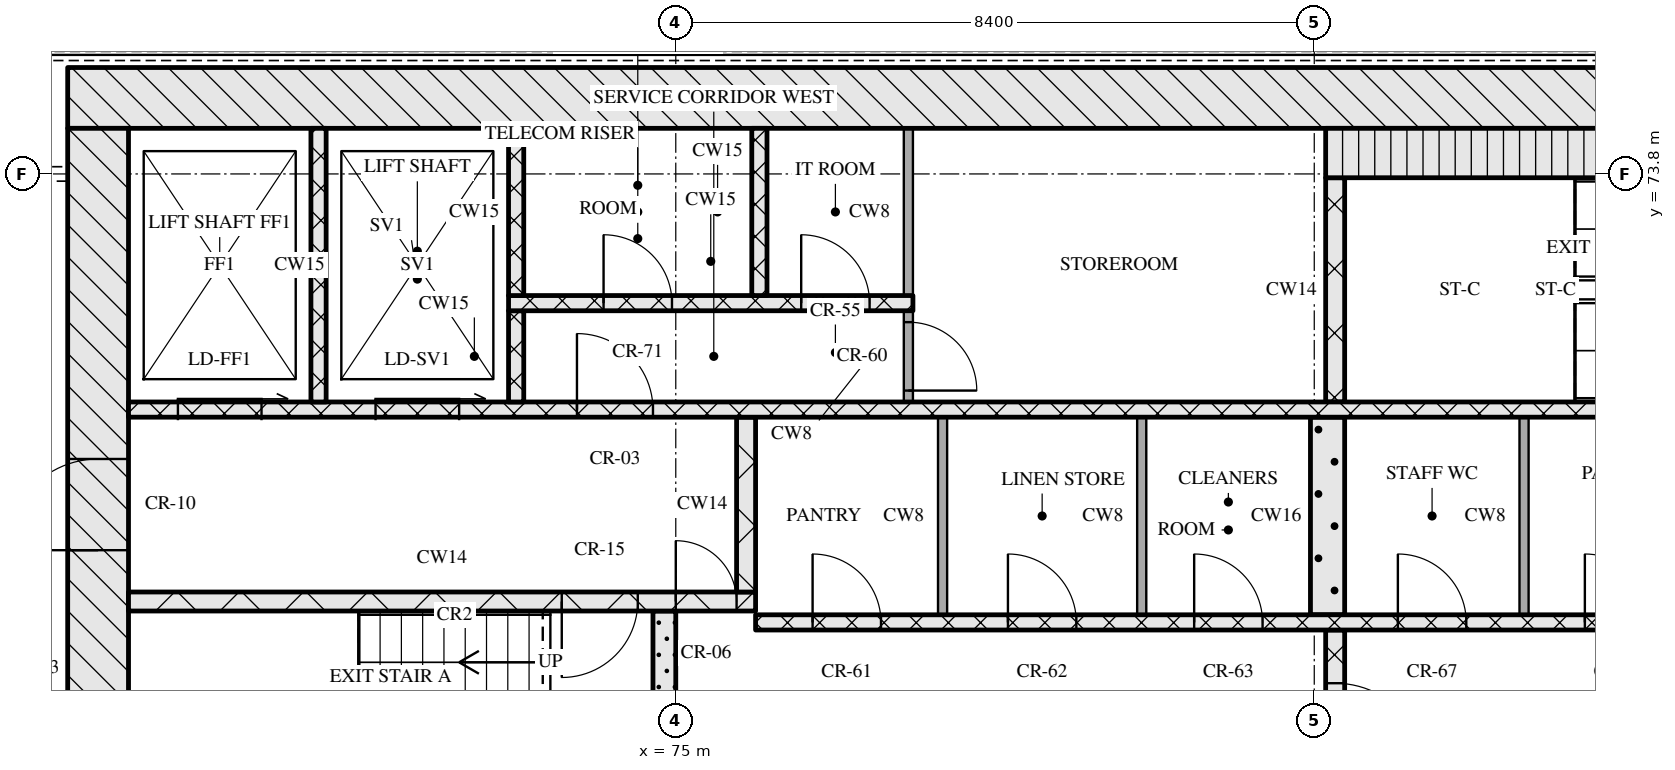
"""IFC4 building model, lengths in metres.
Left out: names, types, materials, properties, quantities, classifications, styles, units other than length and angle.
Written with IfcOpenShell. Run it as: python <this file> out.ifc"""

import sys

from ifc_helpers import new_model, si_unit, direction, frame, frame_2d, origin, place, context, subcontext, project, spatial, rectangle, extrude, element, fill, save


model = new_model("IFC4")
c1 = context("Model", 3, precision=1e-05, world=origin(), true_north=direction((0.0, 1.0)))
c2 = subcontext(c1, "Body", "Model", "MODEL_VIEW")
j1 = project(units=[si_unit("LENGTHUNIT", "METRE"), si_unit("PLANEANGLEUNIT", "RADIAN")], contexts=[c1])
p1 = place(None, origin())
s1 = spatial("IfcSite", under=j1, at=p1, CompositionType="ELEMENT")
p2 = place(p1, origin())
s2 = spatial("IfcBuilding", under=s1, at=p2, CompositionType="ELEMENT")
p3 = place(p2, frame((0.0, 0.0, 179.85)))
s3 = spatial("IfcBuildingStorey", under=s2, at=p3, CompositionType="ELEMENT", Elevation=179.85)
p4 = place(p3, frame((67.0, 74.8, 0.0), z_axis=(0.0, 0.0, 1.0), x_axis=(1.0, 0.0, 0.0)))
e1 = element("IfcWall", 1, at=p4, inside=s3, PredefinedType="SOLIDWALL", context=c2, shape_type="SweptSolid", body=[
    extrude(rectangle(XDim=41.2, YDim=0.8, at=frame_2d((20.6, 0.0))), origin(), (0.0, 0.0, 1.0), 3.32),
])
p5 = place(p3, frame((67.4, 62.4, 0.0), z_axis=(0.0, 0.0, 1.0), x_axis=(0.0, 1.0, 0.0)))
e2 = element("IfcWall", 2, at=p5, inside=s3, PredefinedType="SOLIDWALL", context=c2, shape_type="SweptSolid", body=[
    extrude(rectangle(XDim=12.0, YDim=0.8, at=frame_2d((6.0, 0.0))), origin(), (0.0, 0.0, 1.0), 3.32),
])
p6 = place(p5, frame((6.45, 0.0, 0.0)))
e3 = element("IfcOpeningElement", 3, at=p6, cuts=e2, PredefinedType="OPENING", context=c2, shape_type="SweptSolid", body=[
    extrude(rectangle(XDim=1.2, YDim=2.1, at=frame_2d((0.6, 1.05))), frame((0.0, 0.41, 0.0), z_axis=(0.0, -1.0, 0.0), x_axis=(1.0, 0.0, 0.0)), (0.0, 0.0, 1.0), 0.82),
])
p7 = place(p3, frame((74.85, 65.2, 0.0), z_axis=(0.0, 0.0, 1.0), x_axis=(0.0, 1.0, 0.0)))
e4 = element("IfcWall", 4, at=p7, inside=s3, PredefinedType="SOLIDWALL", context=c2, shape_type="SweptSolid", body=[
    extrude(rectangle(XDim=2.85, YDim=0.3, at=frame_2d((1.425, 0.0))), origin(), (0.0, 0.0, 1.0), 3.32),
])
p8 = place(p3, frame((83.675, 65.2, 0.0), z_axis=(0.0, 0.0, 1.0), x_axis=(0.0, 1.0, 0.0)))
e5 = element("IfcWall", 5, at=p8, inside=s3, PredefinedType="SOLIDWALL", context=c2, shape_type="SweptSolid", body=[
    extrude(rectangle(XDim=2.6, YDim=0.25, at=frame_2d((1.3, 0.0))), origin(), (0.0, 0.0, 1.0), 3.32),
])
p9 = place(p8, frame((0.7, 0.0, 0.0)))
e6 = element("IfcOpeningElement", 6, at=p9, cuts=e5, PredefinedType="OPENING", context=c2, shape_type="SweptSolid", body=[
    extrude(rectangle(XDim=1.2, YDim=2.1, at=frame_2d((0.6, 1.05))), frame((0.0, 0.135, 0.0), z_axis=(0.0, -1.0, 0.0), x_axis=(1.0, 0.0, 0.0)), (0.0, 0.0, 1.0), 0.27),
])
p10 = place(p3, frame((76.05, 67.9, 0.0), z_axis=(0.0, 0.0, 1.0), x_axis=(1.0, 0.0, 0.0)))
e7 = element("IfcWall", 7, at=p10, inside=s3, PredefinedType="SOLIDWALL", context=c2, shape_type="SweptSolid", body=[
    extrude(rectangle(XDim=23.1, YDim=0.2, at=frame_2d((11.55, 0.0))), origin(), (0.0, 0.0, 1.0), 3.32),
])
p11 = place(p10, frame((0.75, 0.0, 0.0)))
e8 = element("IfcOpeningElement", 8, at=p11, cuts=e7, PredefinedType="OPENING", context=c2, shape_type="SweptSolid", body=[
    extrude(rectangle(XDim=0.9, YDim=2.1, at=frame_2d((0.45, 1.05))), frame((0.0, 0.11, 0.0), z_axis=(0.0, -1.0, 0.0), x_axis=(1.0, 0.0, 0.0)), (0.0, 0.0, 1.0), 0.22),
])
p12 = place(p10, frame((3.32, 0.0, 0.0)))
e9 = element("IfcOpeningElement", 9, at=p12, cuts=e7, PredefinedType="OPENING", context=c2, shape_type="SweptSolid", body=[
    extrude(rectangle(XDim=0.9, YDim=2.1, at=frame_2d((0.45, 1.05))), frame((0.0, 0.11, 0.0), z_axis=(0.0, -1.0, 0.0), x_axis=(1.0, 0.0, 0.0)), (0.0, 0.0, 1.0), 0.22),
])
p13 = place(p10, frame((5.77, 0.0, 0.0)))
e10 = element("IfcOpeningElement", 10, at=p13, cuts=e7, PredefinedType="OPENING", context=c2, shape_type="SweptSolid", body=[
    extrude(rectangle(XDim=0.9, YDim=2.1, at=frame_2d((0.45, 1.05))), frame((0.0, 0.11, 0.0), z_axis=(0.0, -1.0, 0.0), x_axis=(1.0, 0.0, 0.0)), (0.0, 0.0, 1.0), 0.22),
])
p14 = place(p10, frame((8.45, 0.0, 0.0)))
e11 = element("IfcOpeningElement", 11, at=p14, cuts=e7, PredefinedType="OPENING", context=c2, shape_type="SweptSolid", body=[
    extrude(rectangle(XDim=0.9, YDim=2.1, at=frame_2d((0.45, 1.05))), frame((0.0, 0.11, 0.0), z_axis=(0.0, -1.0, 0.0), x_axis=(1.0, 0.0, 0.0)), (0.0, 0.0, 1.0), 0.22),
])
p15 = place(p10, frame((10.91, 0.0, 0.0)))
e12 = element("IfcOpeningElement", 12, at=p15, cuts=e7, PredefinedType="OPENING", context=c2, shape_type="SweptSolid", body=[
    extrude(rectangle(XDim=0.9, YDim=2.1, at=frame_2d((0.45, 1.05))), frame((0.0, 0.11, 0.0), z_axis=(0.0, -1.0, 0.0), x_axis=(1.0, 0.0, 0.0)), (0.0, 0.0, 1.0), 0.22),
])
p16 = place(p10, frame((13.55, 0.0, 0.0)))
e13 = element("IfcOpeningElement", 13, at=p16, cuts=e7, PredefinedType="OPENING", context=c2, shape_type="SweptSolid", body=[
    extrude(rectangle(XDim=1.0, YDim=2.1, at=frame_2d((0.5, 1.05))), frame((0.0, 0.11, 0.0), z_axis=(0.0, -1.0, 0.0), x_axis=(1.0, 0.0, 0.0)), (0.0, 0.0, 1.0), 0.22),
])
p17 = place(p10, frame((16.2, 0.0, 0.0)))
e14 = element("IfcOpeningElement", 14, at=p17, cuts=e7, PredefinedType="OPENING", context=c2, shape_type="SweptSolid", body=[
    extrude(rectangle(XDim=1.1, YDim=2.1, at=frame_2d((0.55, 1.05))), frame((0.0, 0.11, 0.0), z_axis=(0.0, -1.0, 0.0), x_axis=(1.0, 0.0, 0.0)), (0.0, 0.0, 1.0), 0.22),
])
p18 = place(p10, frame((18.7, 0.0, 0.0)))
e15 = element("IfcOpeningElement", 15, at=p18, cuts=e7, PredefinedType="OPENING", context=c2, shape_type="SweptSolid", body=[
    extrude(rectangle(XDim=1.1, YDim=2.1, at=frame_2d((0.55, 1.05))), frame((0.0, 0.11, 0.0), z_axis=(0.0, -1.0, 0.0), x_axis=(1.0, 0.0, 0.0)), (0.0, 0.0, 1.0), 0.22),
])
p19 = place(p10, frame((21.2, 0.0, 0.0)))
e16 = element("IfcOpeningElement", 16, at=p19, cuts=e7, PredefinedType="OPENING", context=c2, shape_type="SweptSolid", body=[
    extrude(rectangle(XDim=1.1, YDim=2.1, at=frame_2d((0.55, 1.05))), frame((0.0, 0.11, 0.0), z_axis=(0.0, -1.0, 0.0), x_axis=(1.0, 0.0, 0.0)), (0.0, 0.0, 1.0), 0.22),
])
for number, where, z_axis, x_axis in (
    (17, (78.51, 68.0, 0.0), (0.0, 0.0, 1.0), (0.0, 1.0, 0.0)),
    (18, (81.13, 68.0, 0.0), (0.0, 0.0, 1.0), (0.0, 1.0, 0.0)),
):
    element("IfcWall", number, at=place(p3, frame(where, z_axis=z_axis, x_axis=x_axis)), inside=s3, PredefinedType="PARTITIONING", context=c2, shape_type="SweptSolid", body=[
        extrude(rectangle(XDim=2.6, YDim=0.12, at=frame_2d((1.3, 0.0))), origin(), (0.0, 0.0, 1.0), 3.32),
    ])
p20 = place(p3, frame((83.575, 68.0, 0.0), z_axis=(0.0, 0.0, 1.0), x_axis=(0.0, 1.0, 0.0)))
e19 = element("IfcWall", 19, at=p20, inside=s3, PredefinedType="SOLIDWALL", context=c2, shape_type="SweptSolid", body=[
    extrude(rectangle(XDim=2.6, YDim=0.45, at=frame_2d((1.3, 0.0))), origin(), (0.0, 0.0, 1.0), 3.32),
])
p21 = place(p3, frame((86.16, 68.0, 0.0), z_axis=(0.0, 0.0, 1.0), x_axis=(0.0, 1.0, 0.0)))
e20 = element("IfcWall", 20, at=p21, inside=s3, PredefinedType="PARTITIONING", context=c2, shape_type="SweptSolid", body=[
    extrude(rectangle(XDim=2.6, YDim=0.12, at=frame_2d((1.3, 0.0))), origin(), (0.0, 0.0, 1.0), 3.32),
])
p22 = place(p3, frame((67.8, 68.175, 0.0), z_axis=(0.0, 0.0, 1.0), x_axis=(1.0, 0.0, 0.0)))
e21 = element("IfcWall", 21, at=p22, inside=s3, PredefinedType="SOLIDWALL", context=c2, shape_type="SweptSolid", body=[
    extrude(rectangle(XDim=8.25, YDim=0.25, at=frame_2d((4.125, 0.0))), origin(), (0.0, 0.0, 1.0), 3.32),
])
p23 = place(p22, frame((5.7, 0.0, 0.0)))
e22 = element("IfcOpeningElement", 22, at=p23, cuts=e21, PredefinedType="OPENING", context=c2, shape_type="SweptSolid", body=[
    extrude(rectangle(XDim=1.0, YDim=2.1, at=frame_2d((0.5, 1.05))), frame((0.0, 0.135, 0.0), z_axis=(0.0, -1.0, 0.0), x_axis=(1.0, 0.0, 0.0)), (0.0, 0.0, 1.0), 0.27),
])
p24 = place(p22, frame((7.2, 0.0, 0.0)))
e23 = element("IfcOpeningElement", 23, at=p24, cuts=e21, PredefinedType="OPENING", context=c2, shape_type="SweptSolid", body=[
    extrude(rectangle(XDim=0.8, YDim=2.1, at=frame_2d((0.4, 1.05))), frame((0.0, 0.135, 0.0), z_axis=(0.0, -1.0, 0.0), x_axis=(1.0, 0.0, 0.0)), (0.0, 0.0, 1.0), 0.27),
])
p25 = place(p3, frame((75.925, 68.3, 0.0), z_axis=(0.0, 0.0, 1.0), x_axis=(0.0, 1.0, 0.0)))
e24 = element("IfcWall", 24, at=p25, inside=s3, PredefinedType="SOLIDWALL", context=c2, shape_type="SweptSolid", body=[
    extrude(rectangle(XDim=2.3, YDim=0.25, at=frame_2d((1.15, 0.0))), origin(), (0.0, 0.0, 1.0), 3.32),
])
p26 = place(p3, frame((67.8, 70.7, 0.0), z_axis=(0.0, 0.0, 1.0), x_axis=(1.0, 0.0, 0.0)))
e25 = element("IfcWall", 25, at=p26, inside=s3, PredefinedType="SOLIDWALL", context=c2, shape_type="SweptSolid", body=[
    extrude(rectangle(XDim=39.6, YDim=0.2, at=frame_2d((19.8, 0.0))), origin(), (0.0, 0.0, 1.0), 3.32),
])
p27 = place(p26, frame((0.65, 0.0, 0.0)))
e26 = element("IfcOpeningElement", 26, at=p27, cuts=e25, PredefinedType="OPENING", context=c2, shape_type="SweptSolid", body=[
    extrude(rectangle(XDim=1.1, YDim=2.1, at=frame_2d((0.55, 1.05))), frame((0.0, 0.11, 0.0), z_axis=(0.0, -1.0, 0.0), x_axis=(1.0, 0.0, 0.0)), (0.0, 0.0, 1.0), 0.22),
])
p28 = place(p26, frame((3.25, 0.0, 0.0)))
e27 = element("IfcOpeningElement", 27, at=p28, cuts=e25, PredefinedType="OPENING", context=c2, shape_type="SweptSolid", body=[
    extrude(rectangle(XDim=1.1, YDim=2.1, at=frame_2d((0.55, 1.05))), frame((0.0, 0.11, 0.0), z_axis=(0.0, -1.0, 0.0), x_axis=(1.0, 0.0, 0.0)), (0.0, 0.0, 1.0), 0.22),
])
p29 = place(p26, frame((5.9, 0.0, 0.0)))
e28 = element("IfcOpeningElement", 28, at=p29, cuts=e25, PredefinedType="OPENING", context=c2, shape_type="SweptSolid", body=[
    extrude(rectangle(XDim=1.0, YDim=2.1, at=frame_2d((0.5, 1.05))), frame((0.0, 0.11, 0.0), z_axis=(0.0, -1.0, 0.0), x_axis=(1.0, 0.0, 0.0)), (0.0, 0.0, 1.0), 0.22),
])
p30 = place(p26, frame((21.7, 0.0, 0.0)))
e29 = element("IfcOpeningElement", 29, at=p30, cuts=e25, PredefinedType="OPENING", context=c2, shape_type="SweptSolid", body=[
    extrude(rectangle(XDim=1.0, YDim=2.1, at=frame_2d((0.5, 1.05))), frame((0.0, 0.11, 0.0), z_axis=(0.0, -1.0, 0.0), x_axis=(1.0, 0.0, 0.0)), (0.0, 0.0, 1.0), 0.22),
])
p31 = place(p26, frame((32.7, 0.0, 0.0)))
e30 = element("IfcOpeningElement", 30, at=p31, cuts=e25, PredefinedType="OPENING", context=c2, shape_type="SweptSolid", body=[
    extrude(rectangle(XDim=1.0, YDim=2.1, at=frame_2d((0.5, 1.05))), frame((0.0, 0.11, 0.0), z_axis=(0.0, -1.0, 0.0), x_axis=(1.0, 0.0, 0.0)), (0.0, 0.0, 1.0), 0.22),
])
p32 = place(p26, frame((35.25, 0.0, 0.0)))
e31 = element("IfcOpeningElement", 31, at=p32, cuts=e25, PredefinedType="OPENING", context=c2, shape_type="SweptSolid", body=[
    extrude(rectangle(XDim=1.1, YDim=2.1, at=frame_2d((0.55, 1.05))), frame((0.0, 0.11, 0.0), z_axis=(0.0, -1.0, 0.0), x_axis=(1.0, 0.0, 0.0)), (0.0, 0.0, 1.0), 0.22),
])
p33 = place(p26, frame((37.85, 0.0, 0.0)))
e32 = element("IfcOpeningElement", 32, at=p33, cuts=e25, PredefinedType="OPENING", context=c2, shape_type="SweptSolid", body=[
    extrude(rectangle(XDim=1.1, YDim=2.1, at=frame_2d((0.55, 1.05))), frame((0.0, 0.11, 0.0), z_axis=(0.0, -1.0, 0.0), x_axis=(1.0, 0.0, 0.0)), (0.0, 0.0, 1.0), 0.22),
])
p34 = place(p3, frame((70.3, 70.8, 0.0), z_axis=(0.0, 0.0, 1.0), x_axis=(0.0, 1.0, 0.0)))
e33 = element("IfcWall", 33, at=p34, inside=s3, PredefinedType="SOLIDWALL", context=c2, shape_type="SweptSolid", body=[
    extrude(rectangle(XDim=3.6, YDim=0.2, at=frame_2d((1.8, 0.0))), origin(), (0.0, 0.0, 1.0), 3.32),
])
p35 = place(p3, frame((72.9, 70.8, 0.0), z_axis=(0.0, 0.0, 1.0), x_axis=(0.0, 1.0, 0.0)))
e34 = element("IfcWall", 34, at=p35, inside=s3, PredefinedType="SOLIDWALL", context=c2, shape_type="SweptSolid", body=[
    extrude(rectangle(XDim=1.2, YDim=0.2, at=frame_2d((0.6, 0.0))), origin(), (0.0, 0.0, 1.0), 3.32),
])
p36 = place(p3, frame((78.06, 70.8, 0.0), z_axis=(0.0, 0.0, 1.0), x_axis=(0.0, 1.0, 0.0)))
e35 = element("IfcWall", 35, at=p36, inside=s3, PredefinedType="PARTITIONING", context=c2, shape_type="SweptSolid", body=[
    extrude(rectangle(XDim=1.2, YDim=0.12, at=frame_2d((0.6, 0.0))), origin(), (0.0, 0.0, 1.0), 3.32),
])
p37 = place(p36, frame((0.15, 0.0, 0.0)))
e36 = element("IfcOpeningElement", 36, at=p37, cuts=e35, PredefinedType="OPENING", context=c2, shape_type="SweptSolid", body=[
    extrude(rectangle(XDim=0.9, YDim=2.1, at=frame_2d((0.45, 1.05))), frame((0.0, 0.07, 0.0), z_axis=(0.0, -1.0, 0.0), x_axis=(1.0, 0.0, 0.0)), (0.0, 0.0, 1.0), 0.14),
])
p38 = place(p3, frame((83.675, 70.8, 0.0), z_axis=(0.0, 0.0, 1.0), x_axis=(0.0, 1.0, 0.0)))
e37 = element("IfcWall", 37, at=p38, inside=s3, PredefinedType="SOLIDWALL", context=c2, shape_type="SweptSolid", body=[
    extrude(rectangle(XDim=2.95, YDim=0.25, at=frame_2d((1.475, 0.0))), origin(), (0.0, 0.0, 1.0), 3.32),
])
p39 = place(p3, frame((72.8, 72.1, 0.0), z_axis=(0.0, 0.0, 1.0), x_axis=(1.0, 0.0, 0.0)))
e38 = element("IfcWall", 38, at=p39, inside=s3, PredefinedType="SOLIDWALL", context=c2, shape_type="SweptSolid", body=[
    extrude(rectangle(XDim=5.32, YDim=0.2, at=frame_2d((2.66, 0.0))), origin(), (0.0, 0.0, 1.0), 3.32),
])
p40 = place(p39, frame((1.25, 0.0, 0.0)))
e39 = element("IfcOpeningElement", 39, at=p40, cuts=e38, PredefinedType="OPENING", context=c2, shape_type="SweptSolid", body=[
    extrude(rectangle(XDim=0.9, YDim=2.1, at=frame_2d((0.45, 1.05))), frame((0.0, 0.11, 0.0), z_axis=(0.0, -1.0, 0.0), x_axis=(1.0, 0.0, 0.0)), (0.0, 0.0, 1.0), 0.22),
])
p41 = place(p39, frame((3.85, 0.0, 0.0)))
e40 = element("IfcOpeningElement", 40, at=p41, cuts=e38, PredefinedType="OPENING", context=c2, shape_type="SweptSolid", body=[
    extrude(rectangle(XDim=0.9, YDim=2.1, at=frame_2d((0.45, 1.05))), frame((0.0, 0.11, 0.0), z_axis=(0.0, -1.0, 0.0), x_axis=(1.0, 0.0, 0.0)), (0.0, 0.0, 1.0), 0.22),
])
for number, where, z_axis, x_axis in (
    (41, (72.9, 72.2, 0.0), (0.0, 0.0, 1.0), (0.0, 1.0, 0.0)),
    (42, (76.1, 72.2, 0.0), (0.0, 0.0, 1.0), (0.0, 1.0, 0.0)),
):
    element("IfcWall", number, at=place(p3, frame(where, z_axis=z_axis, x_axis=x_axis)), inside=s3, PredefinedType="SOLIDWALL", context=c2, shape_type="SweptSolid", body=[
        extrude(rectangle(XDim=2.2, YDim=0.2, at=frame_2d((1.1, 0.0))), origin(), (0.0, 0.0, 1.0), 3.32),
    ])
p42 = place(p3, frame((78.06, 72.2, 0.0), z_axis=(0.0, 0.0, 1.0), x_axis=(0.0, 1.0, 0.0)))
e43 = element("IfcWall", 43, at=p42, inside=s3, PredefinedType="PARTITIONING", context=c2, shape_type="SweptSolid", body=[
    extrude(rectangle(XDim=2.2, YDim=0.12, at=frame_2d((1.1, 0.0))), origin(), (0.0, 0.0, 1.0), 3.32),
])
p43 = place(p3, frame((83.55, 74.075, 0.0), z_axis=(0.0, 0.0, 1.0), x_axis=(1.0, 0.0, 0.0)))
e44 = element("IfcWall", 44, at=p43, inside=s3, PredefinedType="SOLIDWALL", context=c2, shape_type="SweptSolid", body=[
    extrude(rectangle(XDim=8.1, YDim=0.65, at=frame_2d((4.05, 0.0))), origin(), (0.0, 0.0, 1.0), 3.32),
])
p44 = place(p9, origin())
e45 = element("IfcDoor", 45, at=p44, inside=s3, OperationType="SINGLE_SWING_RIGHT", PredefinedType="DOOR", context=c2, shape_type="SweptSolid", body=[
    extrude(rectangle(XDim=1.2, YDim=2.1, at=frame_2d((0.6, 1.05))), frame((0.0, 0.025, 0.0), z_axis=(0.0, -1.0, 0.0), x_axis=(1.0, 0.0, 0.0)), (0.0, 0.0, 1.0), 0.05),
])
fill(e6, e45)
p45 = place(p11, origin())
e46 = element("IfcDoor", 46, at=p45, inside=s3, OperationType="SINGLE_SWING_LEFT", PredefinedType="DOOR", context=c2, shape_type="SweptSolid", body=[
    extrude(rectangle(XDim=0.9, YDim=2.1, at=frame_2d((0.45, 1.05))), frame((0.0, 0.025, 0.0), z_axis=(0.0, -1.0, 0.0), x_axis=(1.0, 0.0, 0.0)), (0.0, 0.0, 1.0), 0.05),
])
fill(e8, e46)
p46 = place(p12, origin())
e47 = element("IfcDoor", 47, at=p46, inside=s3, OperationType="SINGLE_SWING_LEFT", PredefinedType="DOOR", context=c2, shape_type="SweptSolid", body=[
    extrude(rectangle(XDim=0.9, YDim=2.1, at=frame_2d((0.45, 1.05))), frame((0.0, 0.025, 0.0), z_axis=(0.0, -1.0, 0.0), x_axis=(1.0, 0.0, 0.0)), (0.0, 0.0, 1.0), 0.05),
])
fill(e9, e47)
p47 = place(p13, origin())
e48 = element("IfcDoor", 48, at=p47, inside=s3, OperationType="SINGLE_SWING_LEFT", PredefinedType="DOOR", context=c2, shape_type="SweptSolid", body=[
    extrude(rectangle(XDim=0.9, YDim=2.1, at=frame_2d((0.45, 1.05))), frame((0.0, 0.025, 0.0), z_axis=(0.0, -1.0, 0.0), x_axis=(1.0, 0.0, 0.0)), (0.0, 0.0, 1.0), 0.05),
])
fill(e10, e48)
p48 = place(p14, origin())
e49 = element("IfcDoor", 49, at=p48, inside=s3, OperationType="SINGLE_SWING_LEFT", PredefinedType="DOOR", context=c2, shape_type="SweptSolid", body=[
    extrude(rectangle(XDim=0.9, YDim=2.1, at=frame_2d((0.45, 1.05))), frame((0.0, 0.025, 0.0), z_axis=(0.0, -1.0, 0.0), x_axis=(1.0, 0.0, 0.0)), (0.0, 0.0, 1.0), 0.05),
])
fill(e11, e49)
p49 = place(p15, origin())
e50 = element("IfcDoor", 50, at=p49, inside=s3, OperationType="SINGLE_SWING_LEFT", PredefinedType="DOOR", context=c2, shape_type="SweptSolid", body=[
    extrude(rectangle(XDim=0.9, YDim=2.1, at=frame_2d((0.45, 1.05))), frame((0.0, 0.025, 0.0), z_axis=(0.0, -1.0, 0.0), x_axis=(1.0, 0.0, 0.0)), (0.0, 0.0, 1.0), 0.05),
])
fill(e12, e50)
p50 = place(p23, origin())
e51 = element("IfcDoor", 51, at=p50, inside=s3, OperationType="SINGLE_SWING_RIGHT", PredefinedType="DOOR", context=c2, shape_type="SweptSolid", body=[
    extrude(rectangle(XDim=1.0, YDim=2.1, at=frame_2d((0.5, 1.05))), frame((0.0, 0.025, 0.0), z_axis=(0.0, -1.0, 0.0), x_axis=(1.0, 0.0, 0.0)), (0.0, 0.0, 1.0), 0.05),
])
fill(e22, e51)
p51 = place(p24, origin())
e52 = element("IfcDoor", 52, at=p51, inside=s3, OperationType="SINGLE_SWING_LEFT", PredefinedType="DOOR", context=c2, shape_type="SweptSolid", body=[
    extrude(rectangle(XDim=0.8, YDim=2.1, at=frame_2d((0.4, 1.05))), frame((0.0, 0.025, 0.0), z_axis=(0.0, -1.0, 0.0), x_axis=(1.0, 0.0, 0.0)), (0.0, 0.0, 1.0), 0.05),
])
fill(e23, e52)
p52 = place(p6, origin())
e53 = element("IfcDoor", 53, at=p52, inside=s3, OperationType="SINGLE_SWING_LEFT", PredefinedType="DOOR", context=c2, shape_type="SweptSolid", body=[
    extrude(rectangle(XDim=1.2, YDim=2.1, at=frame_2d((0.6, 1.05))), frame((0.0, 0.025, 0.0), z_axis=(0.0, -1.0, 0.0), x_axis=(1.0, 0.0, 0.0)), (0.0, 0.0, 1.0), 0.05),
])
fill(e3, e53)
p53 = place(p27, origin())
e54 = element("IfcDoor", 54, at=p53, inside=s3, OperationType="SLIDING_TO_RIGHT", PredefinedType="DOOR", context=c2, shape_type="SweptSolid", body=[
    extrude(rectangle(XDim=1.1, YDim=2.1, at=frame_2d((0.55, 1.05))), frame((0.0, 0.025, 0.0), z_axis=(0.0, -1.0, 0.0), x_axis=(1.0, 0.0, 0.0)), (0.0, 0.0, 1.0), 0.05),
])
fill(e26, e54)
p54 = place(p28, origin())
e55 = element("IfcDoor", 55, at=p54, inside=s3, OperationType="SLIDING_TO_RIGHT", PredefinedType="DOOR", context=c2, shape_type="SweptSolid", body=[
    extrude(rectangle(XDim=1.1, YDim=2.1, at=frame_2d((0.55, 1.05))), frame((0.0, 0.025, 0.0), z_axis=(0.0, -1.0, 0.0), x_axis=(1.0, 0.0, 0.0)), (0.0, 0.0, 1.0), 0.05),
])
fill(e27, e55)
p55 = place(p29, origin())
e56 = element("IfcDoor", 56, at=p55, inside=s3, OperationType="SINGLE_SWING_LEFT", PredefinedType="DOOR", context=c2, shape_type="SweptSolid", body=[
    extrude(rectangle(XDim=1.0, YDim=2.1, at=frame_2d((0.5, 1.05))), frame((0.0, 0.025, 0.0), z_axis=(0.0, -1.0, 0.0), x_axis=(1.0, 0.0, 0.0)), (0.0, 0.0, 1.0), 0.05),
])
fill(e28, e56)
p56 = place(p37, origin())
e57 = element("IfcDoor", 57, at=p56, inside=s3, OperationType="SINGLE_SWING_RIGHT", PredefinedType="DOOR", context=c2, shape_type="SweptSolid", body=[
    extrude(rectangle(XDim=0.9, YDim=2.1, at=frame_2d((0.45, 1.05))), frame((0.0, 0.025, 0.0), z_axis=(0.0, -1.0, 0.0), x_axis=(1.0, 0.0, 0.0)), (0.0, 0.0, 1.0), 0.05),
])
fill(e36, e57)
p57 = place(p40, origin())
e58 = element("IfcDoor", 58, at=p57, inside=s3, OperationType="SINGLE_SWING_LEFT", PredefinedType="DOOR", context=c2, shape_type="SweptSolid", body=[
    extrude(rectangle(XDim=0.9, YDim=2.1, at=frame_2d((0.45, 1.05))), frame((0.0, 0.025, 0.0), z_axis=(0.0, -1.0, 0.0), x_axis=(1.0, 0.0, 0.0)), (0.0, 0.0, 1.0), 0.05),
])
fill(e39, e58)
p58 = place(p41, origin())
e59 = element("IfcDoor", 59, at=p58, inside=s3, OperationType="SINGLE_SWING_LEFT", PredefinedType="DOOR", context=c2, shape_type="SweptSolid", body=[
    extrude(rectangle(XDim=0.9, YDim=2.1, at=frame_2d((0.45, 1.05))), frame((0.0, 0.025, 0.0), z_axis=(0.0, -1.0, 0.0), x_axis=(1.0, 0.0, 0.0)), (0.0, 0.0, 1.0), 0.05),
])
fill(e40, e59)
save(model, sys.argv[1])
